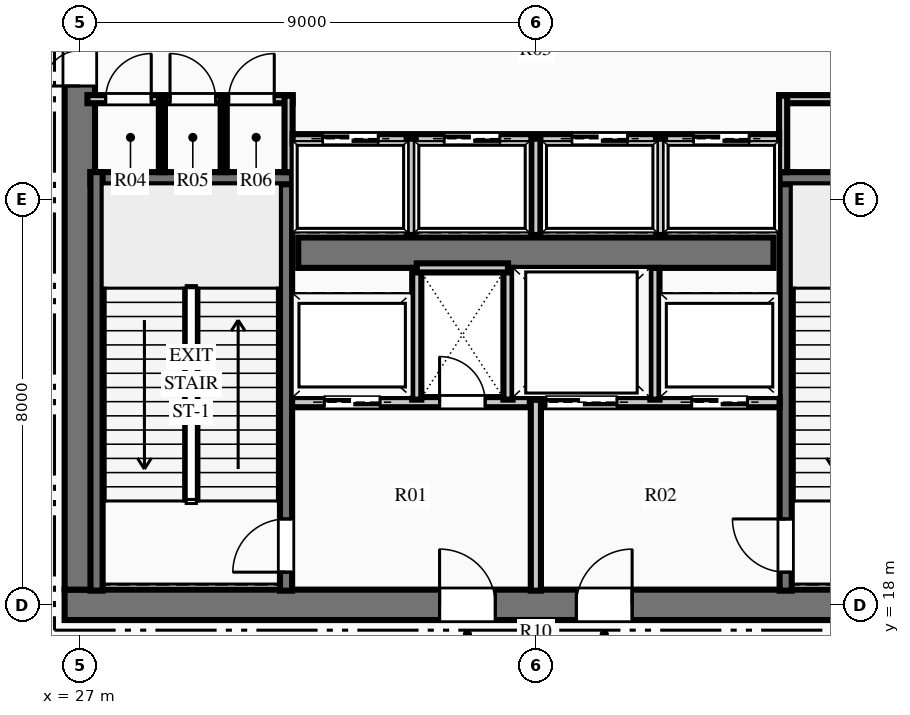
"""IFC4 building model, lengths in metres.
Left out: names, types, materials, properties, quantities, classifications, styles, units other than length and angle.
Written with IfcOpenShell. Run it as: python <this file> out.ifc"""

import sys

from ifc_helpers import new_model, si_unit, direction, frame, frame_2d, origin, place, context, subcontext, project, spatial, rectangle, extrude, element, fill, save


model = new_model("IFC4")
c1 = context("Model", 3, precision=1e-05, world=origin(), true_north=direction((0.0, 1.0)))
c2 = subcontext(c1, "Body", "Model", "MODEL_VIEW")
j1 = project(units=[si_unit("LENGTHUNIT", "METRE"), si_unit("PLANEANGLEUNIT", "RADIAN")], contexts=[c1])
p1 = place(None, origin())
s1 = spatial("IfcSite", under=j1, at=p1, CompositionType="ELEMENT")
p2 = place(p1, origin())
s2 = spatial("IfcBuilding", under=s1, at=p2, CompositionType="ELEMENT")
p3 = place(p2, frame((0.0, 0.0, 11.4)))
s3 = spatial("IfcBuildingStorey", under=s2, at=p3, CompositionType="ELEMENT", Elevation=11.4)
p4 = place(p3, frame((26.7, 18.0, 0.0), z_axis=(0.0, 0.0, 1.0), x_axis=(1.0, 0.0, 0.0)))
e1 = element("IfcWall", 1, at=p4, inside=s3, PredefinedType="SHEAR", context=c2, shape_type="SweptSolid", body=[
    extrude(rectangle(XDim=18.6, YDim=0.6, at=frame_2d((9.3, 0.0))), origin(), (0.0, 0.0, 1.0), 5.4),
])
p5 = place(p4, frame((7.4, 0.0, 0.0)))
e2 = element("IfcOpeningElement", 2, at=p5, cuts=e1, PredefinedType="OPENING", context=c2, shape_type="SweptSolid", body=[
    extrude(rectangle(XDim=1.1, YDim=2.15, at=frame_2d((0.55, 1.075))), frame((0.0, 0.31, 0.0), z_axis=(0.0, -1.0, 0.0), x_axis=(1.0, 0.0, 0.0)), (0.0, 0.0, 1.0), 0.62),
])
p6 = place(p4, frame((10.1, 0.0, 0.0)))
e3 = element("IfcOpeningElement", 3, at=p6, cuts=e1, PredefinedType="OPENING", context=c2, shape_type="SweptSolid", body=[
    extrude(rectangle(XDim=1.1, YDim=2.15, at=frame_2d((0.55, 1.075))), frame((0.0, 0.31, 0.0), z_axis=(0.0, -1.0, 0.0), x_axis=(1.0, 0.0, 0.0)), (0.0, 0.0, 1.0), 0.62),
])
p7 = place(p3, frame((27.0, 18.3, 0.0), z_axis=(0.0, 0.0, 1.0), x_axis=(0.0, 1.0, 0.0)))
e4 = element("IfcWall", 4, at=p7, inside=s3, PredefinedType="SHEAR", context=c2, shape_type="SweptSolid", body=[
    extrude(rectangle(XDim=15.4, YDim=0.6, at=frame_2d((7.7, 0.0))), origin(), (0.0, 0.0, 1.0), 5.4),
])
p8 = place(p7, frame((9.94, 0.0, 0.0)))
e5 = element("IfcOpeningElement", 5, at=p8, cuts=e4, PredefinedType="OPENING", context=c2, shape_type="SweptSolid", body=[
    extrude(rectangle(XDim=1.4, YDim=2.2, at=frame_2d((0.7, 1.1))), frame((0.0, 0.31, 0.0), z_axis=(0.0, -1.0, 0.0), x_axis=(1.0, 0.0, 0.0)), (0.0, 0.0, 1.0), 0.62),
])
p9 = place(p3, frame((31.31, 24.95, 0.0), z_axis=(0.0, 0.0, 1.0), x_axis=(1.0, 0.0, 0.0)))
e6 = element("IfcWall", 6, at=p9, inside=s3, PredefinedType="SHEAR", context=c2, shape_type="SweptSolid", body=[
    extrude(rectangle(XDim=9.38, YDim=0.6, at=frame_2d((4.69, 0.0))), origin(), (0.0, 0.0, 1.0), 5.4),
])
p10 = place(p3, frame((31.07, 18.28, 0.0), z_axis=(0.0, 0.0, 1.0), x_axis=(0.0, 1.0, 0.0)))
e7 = element("IfcWall", 7, at=p10, inside=s3, PredefinedType="SHEAR", context=c2, shape_type="SweptSolid", body=[
    extrude(rectangle(XDim=8.26, YDim=0.24, at=frame_2d((4.13, 0.0))), origin(), (0.0, 0.0, 1.0), 5.4),
])
p11 = place(p10, frame((0.365, 0.0, 0.0)))
e8 = element("IfcOpeningElement", 8, at=p11, cuts=e7, PredefinedType="OPENING", context=c2, shape_type="SweptSolid", body=[
    extrude(rectangle(XDim=1.05, YDim=2.15, at=frame_2d((0.525, 1.075))), frame((0.0, 0.13, 0.0), z_axis=(0.0, -1.0, 0.0), x_axis=(1.0, 0.0, 0.0)), (0.0, 0.0, 1.0), 0.26),
])
p12 = place(p3, frame((27.21, 26.42, 0.0), z_axis=(0.0, 0.0, 1.0), x_axis=(1.0, 0.0, 0.0)))
e9 = element("IfcWall", 9, at=p12, inside=s3, PredefinedType="SHEAR", context=c2, shape_type="SweptSolid", body=[
    extrude(rectangle(XDim=3.98, YDim=0.24, at=frame_2d((1.99, 0.0))), origin(), (0.0, 0.0, 1.0), 5.4),
])
p13 = place(p3, frame((27.33, 18.28, 0.0), z_axis=(0.0, 0.0, 1.0), x_axis=(0.0, 1.0, 0.0)))
e10 = element("IfcWall", 10, at=p13, inside=s3, PredefinedType="SHEAR", context=c2, shape_type="SweptSolid", body=[
    extrude(rectangle(XDim=8.26, YDim=0.24, at=frame_2d((4.13, 0.0))), origin(), (0.0, 0.0, 1.0), 5.4),
])
p14 = place(p3, frame((40.93, 18.28, 0.0), z_axis=(0.0, 0.0, 1.0), x_axis=(0.0, 1.0, 0.0)))
e11 = element("IfcWall", 11, at=p14, inside=s3, PredefinedType="SHEAR", context=c2, shape_type="SweptSolid", body=[
    extrude(rectangle(XDim=8.26, YDim=0.24, at=frame_2d((4.13, 0.0))), origin(), (0.0, 0.0, 1.0), 5.4),
])
p15 = place(p14, frame((0.365, 0.0, 0.0)))
e12 = element("IfcOpeningElement", 12, at=p15, cuts=e11, PredefinedType="OPENING", context=c2, shape_type="SweptSolid", body=[
    extrude(rectangle(XDim=1.05, YDim=2.15, at=frame_2d((0.525, 1.075))), frame((0.0, 0.13, 0.0), z_axis=(0.0, -1.0, 0.0), x_axis=(1.0, 0.0, 0.0)), (0.0, 0.0, 1.0), 0.26),
])
p16 = place(p3, frame((40.81, 26.42, 0.0), z_axis=(0.0, 0.0, 1.0), x_axis=(1.0, 0.0, 0.0)))
e13 = element("IfcWall", 13, at=p16, inside=s3, PredefinedType="SHEAR", context=c2, shape_type="SweptSolid", body=[
    extrude(rectangle(XDim=3.98, YDim=0.24, at=frame_2d((1.99, 0.0))), origin(), (0.0, 0.0, 1.0), 5.4),
])
p17 = place(p3, frame((36.0, 18.28, 0.0), z_axis=(0.0, 0.0, 1.0), x_axis=(0.0, 1.0, 0.0)))
e14 = element("IfcWall", 14, at=p17, inside=s3, PredefinedType="PARTITIONING", context=c2, shape_type="SweptSolid", body=[
    extrude(rectangle(XDim=3.77, YDim=0.2, at=frame_2d((1.885, 0.0))), origin(), (0.0, 0.0, 1.0), 5.07),
])
p18 = place(p3, frame((31.19, 22.0, 0.0), z_axis=(0.0, 0.0, 1.0), x_axis=(1.0, 0.0, 0.0)))
e15 = element("IfcWall", 15, at=p18, inside=s3, PredefinedType="PARTITIONING", context=c2, shape_type="SweptSolid", body=[
    extrude(rectangle(XDim=4.69, YDim=0.2, at=frame_2d((2.345, 0.0))), origin(), (0.0, 0.0, 1.0), 5.07),
])
p19 = place(p18, frame((2.91, 0.0, 0.0)))
e16 = element("IfcOpeningElement", 16, at=p19, cuts=e15, PredefinedType="OPENING", context=c2, shape_type="SweptSolid", body=[
    extrude(rectangle(XDim=0.9, YDim=2.15, at=frame_2d((0.45, 1.075))), frame((0.0, 0.11, 0.0), z_axis=(0.0, -1.0, 0.0), x_axis=(1.0, 0.0, 0.0)), (0.0, 0.0, 1.0), 0.22),
])
p20 = place(p18, frame((0.635, 0.0, 0.0)))
e17 = element("IfcOpeningElement", 17, at=p20, cuts=e15, PredefinedType="OPENING", context=c2, shape_type="SweptSolid", body=[
    extrude(rectangle(XDim=1.1, YDim=2.15, at=frame_2d((0.55, 1.075))), frame((0.0, 0.11, 0.0), z_axis=(0.0, -1.0, 0.0), x_axis=(1.0, 0.0, 0.0)), (0.0, 0.0, 1.0), 0.22),
])
p21 = place(p3, frame((36.12, 22.0, 0.0), z_axis=(0.0, 0.0, 1.0), x_axis=(1.0, 0.0, 0.0)))
e18 = element("IfcWall", 18, at=p21, inside=s3, PredefinedType="PARTITIONING", context=c2, shape_type="SweptSolid", body=[
    extrude(rectangle(XDim=4.69, YDim=0.2, at=frame_2d((2.345, 0.0))), origin(), (0.0, 0.0, 1.0), 5.07),
])
p22 = place(p21, frame((2.955, 0.0, 0.0)))
e19 = element("IfcOpeningElement", 19, at=p22, cuts=e18, PredefinedType="OPENING", context=c2, shape_type="SweptSolid", body=[
    extrude(rectangle(XDim=1.1, YDim=2.15, at=frame_2d((0.55, 1.075))), frame((0.0, 0.11, 0.0), z_axis=(0.0, -1.0, 0.0), x_axis=(1.0, 0.0, 0.0)), (0.0, 0.0, 1.0), 0.22),
])
p23 = place(p21, frame((0.08, 0.0, 0.0)))
e20 = element("IfcOpeningElement", 20, at=p23, cuts=e18, PredefinedType="OPENING", context=c2, shape_type="SweptSolid", body=[
    extrude(rectangle(XDim=1.4, YDim=2.2, at=frame_2d((0.7, 1.1))), frame((0.0, 0.11, 0.0), z_axis=(0.0, -1.0, 0.0), x_axis=(1.0, 0.0, 0.0)), (0.0, 0.0, 1.0), 0.22),
])
for number, where, z_axis, x_axis in (
    (21, (33.65, 22.05, 0.0), (0.0, 0.0, 1.0), (0.0, 1.0, 0.0)),
    (22, (35.45, 22.05, 0.0), (0.0, 0.0, 1.0), (0.0, 1.0, 0.0)),
):
    element("IfcWall", number, at=place(p3, frame(where, z_axis=z_axis, x_axis=x_axis)), inside=s3, PredefinedType="PARTITIONING", context=c2, shape_type="SweptSolid", body=[
        extrude(rectangle(XDim=2.6, YDim=0.18, at=frame_2d((1.3, 0.0))), origin(), (0.0, 0.0, 1.0), 5.07),
    ])
p24 = place(p3, frame((33.65, 24.65, 0.0), z_axis=(0.0, 0.0, 1.0), x_axis=(1.0, 0.0, 0.0)))
e23 = element("IfcWall", 23, at=p24, inside=s3, PredefinedType="PARTITIONING", context=c2, shape_type="SweptSolid", body=[
    extrude(rectangle(XDim=1.8, YDim=0.18, at=frame_2d((0.9, 0.0))), origin(), (0.0, 0.0, 1.0), 5.07),
])
p25 = place(p3, frame((38.35, 22.05, 0.0), z_axis=(0.0, 0.0, 1.0), x_axis=(0.0, 1.0, 0.0)))
e24 = element("IfcWall", 24, at=p25, inside=s3, PredefinedType="PARTITIONING", context=c2, shape_type="SweptSolid", body=[
    extrude(rectangle(XDim=2.6, YDim=0.18, at=frame_2d((1.3, 0.0))), origin(), (0.0, 0.0, 1.0), 5.07),
])
p26 = place(p3, frame((27.15, 27.98, 0.0), z_axis=(0.0, 0.0, 1.0), x_axis=(1.0, 0.0, 0.0)))
e25 = element("IfcWall", 25, at=p26, inside=s3, PredefinedType="PARTITIONING", context=c2, shape_type="SweptSolid", body=[
    extrude(rectangle(XDim=4.05, YDim=0.16, at=frame_2d((2.025, 0.0))), origin(), (0.0, 0.0, 1.0), 5.07),
])
p27 = place(p26, frame((0.36, 0.0, 0.0)))
e26 = element("IfcOpeningElement", 26, at=p27, cuts=e25, PredefinedType="OPENING", context=c2, shape_type="SweptSolid", body=[
    extrude(rectangle(XDim=0.9, YDim=2.15, at=frame_2d((0.45, 1.075))), frame((0.0, 0.09, 0.0), z_axis=(0.0, -1.0, 0.0), x_axis=(1.0, 0.0, 0.0)), (0.0, 0.0, 1.0), 0.18),
])
p28 = place(p26, frame((1.63, 0.0, 0.0)))
e27 = element("IfcOpeningElement", 27, at=p28, cuts=e25, PredefinedType="OPENING", context=c2, shape_type="SweptSolid", body=[
    extrude(rectangle(XDim=0.9, YDim=2.15, at=frame_2d((0.45, 1.075))), frame((0.0, 0.09, 0.0), z_axis=(0.0, -1.0, 0.0), x_axis=(1.0, 0.0, 0.0)), (0.0, 0.0, 1.0), 0.18),
])
p29 = place(p26, frame((2.788, 0.0, 0.0)))
e28 = element("IfcOpeningElement", 28, at=p29, cuts=e25, PredefinedType="OPENING", context=c2, shape_type="SweptSolid", body=[
    extrude(rectangle(XDim=0.9, YDim=2.15, at=frame_2d((0.45, 1.075))), frame((0.0, 0.09, 0.0), z_axis=(0.0, -1.0, 0.0), x_axis=(1.0, 0.0, 0.0)), (0.0, 0.0, 1.0), 0.18),
])
p30 = place(p3, frame((31.12, 26.54, 0.0), z_axis=(0.0, 0.0, 1.0), x_axis=(0.0, 1.0, 0.0)))
e29 = element("IfcWall", 29, at=p30, inside=s3, PredefinedType="PARTITIONING", context=c2, shape_type="SweptSolid", body=[
    extrude(rectangle(XDim=1.51, YDim=0.16, at=frame_2d((0.755, 0.0))), origin(), (0.0, 0.0, 1.0), 5.07),
])
p31 = place(p3, frame((40.8, 27.98, 0.0), z_axis=(0.0, 0.0, 1.0), x_axis=(1.0, 0.0, 0.0)))
e30 = element("IfcWall", 30, at=p31, inside=s3, PredefinedType="PARTITIONING", context=c2, shape_type="SweptSolid", body=[
    extrude(rectangle(XDim=4.05, YDim=0.16, at=frame_2d((2.025, 0.0))), origin(), (0.0, 0.0, 1.0), 5.07),
])
p32 = place(p31, frame((1.475, 0.0, 0.0)))
e31 = element("IfcOpeningElement", 31, at=p32, cuts=e30, PredefinedType="OPENING", context=c2, shape_type="SweptSolid", body=[
    extrude(rectangle(XDim=0.95, YDim=2.15, at=frame_2d((0.475, 1.075))), frame((0.0, 0.09, 0.0), z_axis=(0.0, -1.0, 0.0), x_axis=(1.0, 0.0, 0.0)), (0.0, 0.0, 1.0), 0.18),
])
p33 = place(p3, frame((40.88, 26.54, 0.0), z_axis=(0.0, 0.0, 1.0), x_axis=(0.0, 1.0, 0.0)))
e32 = element("IfcWall", 32, at=p33, inside=s3, PredefinedType="PARTITIONING", context=c2, shape_type="SweptSolid", body=[
    extrude(rectangle(XDim=1.51, YDim=0.16, at=frame_2d((0.755, 0.0))), origin(), (0.0, 0.0, 1.0), 5.07),
])
for number, where, z_axis, x_axis in (
    (33, (28.62, 26.54, 0.0), (0.0, 0.0, 1.0), (0.0, 1.0, 0.0)),
    (34, (29.84, 26.54, 0.0), (0.0, 0.0, 1.0), (0.0, 1.0, 0.0)),
):
    element("IfcWall", number, at=place(p3, frame(where, z_axis=z_axis, x_axis=x_axis)), inside=s3, PredefinedType="PARTITIONING", context=c2, shape_type="SweptSolid", body=[
        extrude(rectangle(XDim=1.44, YDim=0.12, at=frame_2d((0.72, 0.0))), origin(), (0.0, 0.0, 1.0), 5.07),
    ])
p34 = place(p3, frame((31.2, 27.2, 0.0), z_axis=(0.0, 0.0, 1.0), x_axis=(1.0, 0.0, 0.0)))
e35 = element("IfcWall", 35, at=p34, inside=s3, PredefinedType="PARTITIONING", context=c2, shape_type="SweptSolid", body=[
    extrude(rectangle(XDim=9.6, YDim=0.18, at=frame_2d((4.8, 0.0))), origin(), (0.0, 0.0, 1.0), 5.07),
])
p35 = place(p34, frame((0.59, 0.0, 0.0)))
e36 = element("IfcOpeningElement", 36, at=p35, cuts=e35, PredefinedType="OPENING", context=c2, shape_type="SweptSolid", body=[
    extrude(rectangle(XDim=1.1, YDim=2.15, at=frame_2d((0.55, 1.075))), frame((0.0, 0.1, 0.0), z_axis=(0.0, -1.0, 0.0), x_axis=(1.0, 0.0, 0.0)), (0.0, 0.0, 1.0), 0.2),
])
p36 = place(p34, frame((2.99, 0.0, 0.0)))
e37 = element("IfcOpeningElement", 37, at=p36, cuts=e35, PredefinedType="OPENING", context=c2, shape_type="SweptSolid", body=[
    extrude(rectangle(XDim=1.1, YDim=2.15, at=frame_2d((0.55, 1.075))), frame((0.0, 0.1, 0.0), z_axis=(0.0, -1.0, 0.0), x_axis=(1.0, 0.0, 0.0)), (0.0, 0.0, 1.0), 0.2),
])
p37 = place(p34, frame((5.51, 0.0, 0.0)))
e38 = element("IfcOpeningElement", 38, at=p37, cuts=e35, PredefinedType="OPENING", context=c2, shape_type="SweptSolid", body=[
    extrude(rectangle(XDim=1.1, YDim=2.15, at=frame_2d((0.55, 1.075))), frame((0.0, 0.1, 0.0), z_axis=(0.0, -1.0, 0.0), x_axis=(1.0, 0.0, 0.0)), (0.0, 0.0, 1.0), 0.2),
])
p38 = place(p34, frame((7.91, 0.0, 0.0)))
e39 = element("IfcOpeningElement", 39, at=p38, cuts=e35, PredefinedType="OPENING", context=c2, shape_type="SweptSolid", body=[
    extrude(rectangle(XDim=1.1, YDim=2.15, at=frame_2d((0.55, 1.075))), frame((0.0, 0.1, 0.0), z_axis=(0.0, -1.0, 0.0), x_axis=(1.0, 0.0, 0.0)), (0.0, 0.0, 1.0), 0.2),
])
for number, where, z_axis, x_axis in (
    (40, (33.54, 25.3, 0.0), (0.0, 0.0, 1.0), (0.0, 1.0, 0.0)),
    (41, (36.0, 25.3, 0.0), (0.0, 0.0, 1.0), (0.0, 1.0, 0.0)),
    (42, (38.46, 25.3, 0.0), (0.0, 0.0, 1.0), (0.0, 1.0, 0.0)),
):
    element("IfcWall", number, at=place(p3, frame(where, z_axis=z_axis, x_axis=x_axis)), inside=s3, PredefinedType="PARTITIONING", context=c2, shape_type="SweptSolid", body=[
        extrude(rectangle(XDim=1.9, YDim=0.18, at=frame_2d((0.95, 0.0))), origin(), (0.0, 0.0, 1.0), 5.07),
    ])
p39 = place(p27, origin())
e43 = element("IfcDoor", 43, at=p39, inside=s3, OperationType="SINGLE_SWING_RIGHT", PredefinedType="DOOR", context=c2, shape_type="SweptSolid", body=[
    extrude(rectangle(XDim=0.9, YDim=2.15, at=frame_2d((0.45, 1.075))), frame((0.0, 0.025, 0.0), z_axis=(0.0, -1.0, 0.0), x_axis=(1.0, 0.0, 0.0)), (0.0, 0.0, 1.0), 0.05),
])
fill(e26, e43)
p40 = place(p28, origin())
e44 = element("IfcDoor", 44, at=p40, inside=s3, OperationType="SINGLE_SWING_LEFT", PredefinedType="DOOR", context=c2, shape_type="SweptSolid", body=[
    extrude(rectangle(XDim=0.9, YDim=2.15, at=frame_2d((0.45, 1.075))), frame((0.0, 0.025, 0.0), z_axis=(0.0, -1.0, 0.0), x_axis=(1.0, 0.0, 0.0)), (0.0, 0.0, 1.0), 0.05),
])
fill(e27, e44)
p41 = place(p29, origin())
e45 = element("IfcDoor", 45, at=p41, inside=s3, OperationType="SINGLE_SWING_RIGHT", PredefinedType="DOOR", context=c2, shape_type="SweptSolid", body=[
    extrude(rectangle(XDim=0.9, YDim=2.15, at=frame_2d((0.45, 1.075))), frame((0.0, 0.025, 0.0), z_axis=(0.0, -1.0, 0.0), x_axis=(1.0, 0.0, 0.0)), (0.0, 0.0, 1.0), 0.05),
])
fill(e28, e45)
p42 = place(p11, origin())
e46 = element("IfcDoor", 46, at=p42, inside=s3, OperationType="SINGLE_SWING_LEFT", PredefinedType="DOOR", context=c2, shape_type="SweptSolid", body=[
    extrude(rectangle(XDim=1.05, YDim=2.15, at=frame_2d((0.525, 1.075))), frame((0.0, 0.025, 0.0), z_axis=(0.0, -1.0, 0.0), x_axis=(1.0, 0.0, 0.0)), (0.0, 0.0, 1.0), 0.05),
])
fill(e8, e46)
p43 = place(p15, origin())
e47 = element("IfcDoor", 47, at=p43, inside=s3, OperationType="SINGLE_SWING_RIGHT", PredefinedType="DOOR", context=c2, shape_type="SweptSolid", body=[
    extrude(rectangle(XDim=1.05, YDim=2.15, at=frame_2d((0.525, 1.075))), frame((0.0, 0.025, 0.0), z_axis=(0.0, -1.0, 0.0), x_axis=(1.0, 0.0, 0.0)), (0.0, 0.0, 1.0), 0.05),
])
fill(e12, e47)
p44 = place(p5, origin())
e48 = element("IfcDoor", 48, at=p44, inside=s3, OperationType="SINGLE_SWING_LEFT", PredefinedType="DOOR", context=c2, shape_type="SweptSolid", body=[
    extrude(rectangle(XDim=1.1, YDim=2.15, at=frame_2d((0.55, 1.075))), frame((0.0, 0.025, 0.0), z_axis=(0.0, -1.0, 0.0), x_axis=(1.0, 0.0, 0.0)), (0.0, 0.0, 1.0), 0.05),
])
fill(e2, e48)
p45 = place(p6, origin())
e49 = element("IfcDoor", 49, at=p45, inside=s3, OperationType="SINGLE_SWING_RIGHT", PredefinedType="DOOR", context=c2, shape_type="SweptSolid", body=[
    extrude(rectangle(XDim=1.1, YDim=2.15, at=frame_2d((0.55, 1.075))), frame((0.0, 0.025, 0.0), z_axis=(0.0, -1.0, 0.0), x_axis=(1.0, 0.0, 0.0)), (0.0, 0.0, 1.0), 0.05),
])
fill(e3, e49)
p46 = place(p19, origin())
e50 = element("IfcDoor", 50, at=p46, inside=s3, OperationType="SINGLE_SWING_LEFT", PredefinedType="DOOR", context=c2, shape_type="SweptSolid", body=[
    extrude(rectangle(XDim=0.9, YDim=2.15, at=frame_2d((0.45, 1.075))), frame((0.0, 0.025, 0.0), z_axis=(0.0, -1.0, 0.0), x_axis=(1.0, 0.0, 0.0)), (0.0, 0.0, 1.0), 0.05),
])
fill(e16, e50)
p47 = place(p8, origin())
e51 = element("IfcDoor", 51, at=p47, inside=s3, OperationType="DOUBLE_DOOR_SINGLE_SWING", PredefinedType="DOOR", context=c2, shape_type="SweptSolid", body=[
    extrude(rectangle(XDim=1.4, YDim=2.2, at=frame_2d((0.7, 1.1))), frame((0.0, 0.025, 0.0), z_axis=(0.0, -1.0, 0.0), x_axis=(1.0, 0.0, 0.0)), (0.0, 0.0, 1.0), 0.05),
])
fill(e5, e51)
p48 = place(p35, origin())
e52 = element("IfcDoor", 52, at=p48, inside=s3, OperationType="SLIDING_TO_LEFT", PredefinedType="DOOR", context=c2, shape_type="SweptSolid", body=[
    extrude(rectangle(XDim=1.1, YDim=2.15, at=frame_2d((0.55, 1.075))), frame((0.0, 0.025, 0.0), z_axis=(0.0, -1.0, 0.0), x_axis=(1.0, 0.0, 0.0)), (0.0, 0.0, 1.0), 0.05),
])
fill(e36, e52)
p49 = place(p36, origin())
e53 = element("IfcDoor", 53, at=p49, inside=s3, OperationType="SLIDING_TO_LEFT", PredefinedType="DOOR", context=c2, shape_type="SweptSolid", body=[
    extrude(rectangle(XDim=1.1, YDim=2.15, at=frame_2d((0.55, 1.075))), frame((0.0, 0.025, 0.0), z_axis=(0.0, -1.0, 0.0), x_axis=(1.0, 0.0, 0.0)), (0.0, 0.0, 1.0), 0.05),
])
fill(e37, e53)
p50 = place(p37, origin())
e54 = element("IfcDoor", 54, at=p50, inside=s3, OperationType="SLIDING_TO_LEFT", PredefinedType="DOOR", context=c2, shape_type="SweptSolid", body=[
    extrude(rectangle(XDim=1.1, YDim=2.15, at=frame_2d((0.55, 1.075))), frame((0.0, 0.025, 0.0), z_axis=(0.0, -1.0, 0.0), x_axis=(1.0, 0.0, 0.0)), (0.0, 0.0, 1.0), 0.05),
])
fill(e38, e54)
p51 = place(p38, origin())
e55 = element("IfcDoor", 55, at=p51, inside=s3, OperationType="SLIDING_TO_LEFT", PredefinedType="DOOR", context=c2, shape_type="SweptSolid", body=[
    extrude(rectangle(XDim=1.1, YDim=2.15, at=frame_2d((0.55, 1.075))), frame((0.0, 0.025, 0.0), z_axis=(0.0, -1.0, 0.0), x_axis=(1.0, 0.0, 0.0)), (0.0, 0.0, 1.0), 0.05),
])
fill(e39, e55)
p52 = place(p20, origin())
e56 = element("IfcDoor", 56, at=p52, inside=s3, OperationType="SLIDING_TO_LEFT", PredefinedType="DOOR", context=c2, shape_type="SweptSolid", body=[
    extrude(rectangle(XDim=1.1, YDim=2.15, at=frame_2d((0.55, 1.075))), frame((0.0, 0.025, 0.0), z_axis=(0.0, -1.0, 0.0), x_axis=(1.0, 0.0, 0.0)), (0.0, 0.0, 1.0), 0.05),
])
fill(e17, e56)
p53 = place(p22, origin())
e57 = element("IfcDoor", 57, at=p53, inside=s3, OperationType="SLIDING_TO_LEFT", PredefinedType="DOOR", context=c2, shape_type="SweptSolid", body=[
    extrude(rectangle(XDim=1.1, YDim=2.15, at=frame_2d((0.55, 1.075))), frame((0.0, 0.025, 0.0), z_axis=(0.0, -1.0, 0.0), x_axis=(1.0, 0.0, 0.0)), (0.0, 0.0, 1.0), 0.05),
])
fill(e19, e57)
p54 = place(p23, origin())
e58 = element("IfcDoor", 58, at=p54, inside=s3, OperationType="SLIDING_TO_LEFT", PredefinedType="DOOR", context=c2, shape_type="SweptSolid", body=[
    extrude(rectangle(XDim=1.4, YDim=2.2, at=frame_2d((0.7, 1.1))), frame((0.0, 0.025, 0.0), z_axis=(0.0, -1.0, 0.0), x_axis=(1.0, 0.0, 0.0)), (0.0, 0.0, 1.0), 0.05),
])
fill(e20, e58)
save(model, sys.argv[1])
